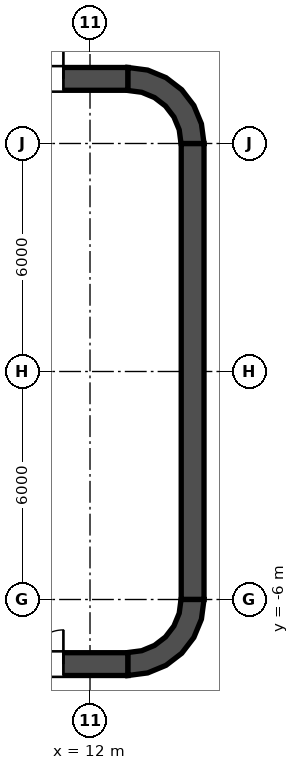
"""IFC4 building model, lengths in metres.
Left out: names, types, materials, properties, quantities, classifications, styles, units other than length and angle.
Written with IfcOpenShell. Run it as: python <this file> out.ifc"""

import sys

from ifc_helpers import new_model, si_unit, direction, frame, frame_2d, origin, place, context, subcontext, project, spatial, polyline, rectangle, outline, extrude, element, fill, save


model = new_model("IFC4")
c1 = context("Model", 3, precision=1e-05, world=origin(), true_north=direction((0.0, 1.0)))
c2 = subcontext(c1, "Body", "Model", "MODEL_VIEW")
j1 = project(units=[si_unit("LENGTHUNIT", "METRE"), si_unit("PLANEANGLEUNIT", "RADIAN")], contexts=[c1])
p1 = place(None, origin())
s1 = spatial("IfcSite", under=j1, at=p1, CompositionType="ELEMENT")
p2 = place(p1, origin())
s2 = spatial("IfcBuilding", under=s1, at=p2, CompositionType="ELEMENT")
p3 = place(p2, frame((0.0, 0.0, 144.0)))
s3 = spatial("IfcBuildingStorey", under=s2, at=p3, CompositionType="ELEMENT", Elevation=144.0)
p4 = place(p3, frame((-13.0, 7.7, 0.0), z_axis=(0.0, 0.0, 1.0), x_axis=(1.0, 0.0, 0.0)))
e1 = element("IfcWall", 1, at=p4, inside=s3, PredefinedType="SHEAR", context=c2, shape_type="SweptSolid", body=[
    extrude(rectangle(XDim=26.0, YDim=0.6, at=frame_2d((13.0, 0.0))), origin(), (0.0, 0.0, 1.0), 4.2),
])
p5 = place(p4, frame((1.7, 0.0, 0.0)))
e2 = element("IfcOpeningElement", 2, at=p5, cuts=e1, PredefinedType="OPENING", context=c2, shape_type="SweptSolid", body=[
    extrude(rectangle(XDim=1.8, YDim=2.1, at=frame_2d((0.9, 1.05))), frame((0.0, 0.3, 0.0), z_axis=(0.0, -1.0, 0.0), x_axis=(1.0, 0.0, 0.0)), (0.0, 0.0, 1.0), 0.6),
])
p6 = place(p4, frame((22.5, 0.0, 0.0)))
e3 = element("IfcOpeningElement", 3, at=p6, cuts=e1, PredefinedType="OPENING", context=c2, shape_type="SweptSolid", body=[
    extrude(rectangle(XDim=1.8, YDim=2.1, at=frame_2d((0.9, 1.05))), frame((0.0, 0.3, 0.0), z_axis=(0.0, -1.0, 0.0), x_axis=(1.0, 0.0, 0.0)), (0.0, 0.0, 1.0), 0.6),
])
p7 = place(p3, frame((-13.0, -7.7, 0.0), z_axis=(0.0, 0.0, 1.0), x_axis=(1.0, 0.0, 0.0)))
e4 = element("IfcWall", 4, at=p7, inside=s3, PredefinedType="SHEAR", context=c2, shape_type="SweptSolid", body=[
    extrude(rectangle(XDim=26.0, YDim=0.6, at=frame_2d((13.0, 0.0))), origin(), (0.0, 0.0, 1.0), 4.2),
])
p8 = place(p7, frame((1.7, 0.0, 0.0)))
e5 = element("IfcOpeningElement", 5, at=p8, cuts=e4, PredefinedType="OPENING", context=c2, shape_type="SweptSolid", body=[
    extrude(rectangle(XDim=1.8, YDim=2.1, at=frame_2d((0.9, 1.05))), frame((0.0, 0.3, 0.0), z_axis=(0.0, -1.0, 0.0), x_axis=(1.0, 0.0, 0.0)), (0.0, 0.0, 1.0), 0.6),
])
p9 = place(p7, frame((22.5, 0.0, 0.0)))
e6 = element("IfcOpeningElement", 6, at=p9, cuts=e4, PredefinedType="OPENING", context=c2, shape_type="SweptSolid", body=[
    extrude(rectangle(XDim=1.8, YDim=2.1, at=frame_2d((0.9, 1.05))), frame((0.0, 0.3, 0.0), z_axis=(0.0, -1.0, 0.0), x_axis=(1.0, 0.0, 0.0)), (0.0, 0.0, 1.0), 0.6),
])
p10 = place(p3, frame((14.7, -6.0, 0.0), z_axis=(0.0, 0.0, 1.0), x_axis=(0.0, 1.0, 0.0)))
e7 = element("IfcWall", 7, at=p10, inside=s3, PredefinedType="SHEAR", context=c2, shape_type="SweptSolid", body=[
    extrude(rectangle(XDim=12.0, YDim=0.6, at=frame_2d((6.0, 0.0))), origin(), (0.0, 0.0, 1.0), 4.2),
])
p11 = place(p3, origin())
e8 = element("IfcWall", 8, at=p11, inside=s3, PredefinedType="SHEAR", context=c2, shape_type="SweptSolid", body=[
    extrude(outline(polyline([(13.0, 8.0), (13.0, 7.395), (13.361, 7.347), (13.698, 7.208), (13.986, 6.986), (14.208, 6.698), (14.347, 6.361), (14.395, 6.0), (15.0, 6.0), (14.932, 6.518), (14.732, 7.0), (14.414, 7.414), (14.0, 7.732), (13.518, 7.932), (13.0, 8.0)])), origin(), (0.0, 0.0, 1.0), 4.2),
])
e9 = element("IfcWall", 9, at=p11, inside=s3, PredefinedType="SHEAR", context=c2, shape_type="SweptSolid", body=[
    extrude(outline(polyline([(15.0, -6.0), (14.395, -6.0), (14.347, -6.361), (14.208, -6.698), (13.986, -6.986), (13.698, -7.208), (13.361, -7.347), (13.0, -7.395), (13.0, -8.0), (13.518, -7.932), (14.0, -7.732), (14.414, -7.414), (14.732, -7.0), (14.932, -6.518), (15.0, -6.0)])), origin(), (0.0, 0.0, 1.0), 4.2),
])
p12 = place(p3, frame((11.8, -7.4, 0.0), z_axis=(0.0, 0.0, 1.0), x_axis=(0.0, 1.0, 0.0)))
e10 = element("IfcWall", 10, at=p12, inside=s3, PredefinedType="SOLIDWALL", context=c2, shape_type="SweptSolid", body=[
    extrude(rectangle(XDim=14.8, YDim=0.4, at=frame_2d((7.4, 0.0))), origin(), (0.0, 0.0, 1.0), 3.9),
])
p13 = place(p12, frame((11.2, 0.0, 0.0)))
e11 = element("IfcOpeningElement", 11, at=p13, cuts=e10, PredefinedType="OPENING", context=c2, shape_type="SweptSolid", body=[
    extrude(rectangle(XDim=1.1, YDim=2.1, at=frame_2d((0.55, 1.05))), frame((0.0, 0.2, 0.0), z_axis=(0.0, -1.0, 0.0), x_axis=(1.0, 0.0, 0.0)), (0.0, 0.0, 1.0), 0.4),
])
p14 = place(p12, frame((8.3, 0.0, 0.0)))
e12 = element("IfcOpeningElement", 12, at=p14, cuts=e10, PredefinedType="OPENING", context=c2, shape_type="SweptSolid", body=[
    extrude(rectangle(XDim=1.1, YDim=2.1, at=frame_2d((0.55, 1.05))), frame((0.0, 0.2, 0.0), z_axis=(0.0, -1.0, 0.0), x_axis=(1.0, 0.0, 0.0)), (0.0, 0.0, 1.0), 0.4),
])
p15 = place(p12, frame((5.4, 0.0, 0.0)))
e13 = element("IfcOpeningElement", 13, at=p15, cuts=e10, PredefinedType="OPENING", context=c2, shape_type="SweptSolid", body=[
    extrude(rectangle(XDim=1.1, YDim=2.1, at=frame_2d((0.55, 1.05))), frame((0.0, 0.2, 0.0), z_axis=(0.0, -1.0, 0.0), x_axis=(1.0, 0.0, 0.0)), (0.0, 0.0, 1.0), 0.4),
])
p16 = place(p12, frame((13.552, 0.0, 0.0)))
e14 = element("IfcOpeningElement", 14, at=p16, cuts=e10, PredefinedType="OPENING", context=c2, shape_type="SweptSolid", body=[
    extrude(rectangle(XDim=0.9, YDim=2.1, at=frame_2d((0.45, 1.05))), frame((0.0, 0.2, 0.0), z_axis=(0.0, -1.0, 0.0), x_axis=(1.0, 0.0, 0.0)), (0.0, 0.0, 1.0), 0.4),
])
p17 = place(p12, frame((0.347, 0.0, 0.0)))
e15 = element("IfcOpeningElement", 15, at=p17, cuts=e10, PredefinedType="OPENING", context=c2, shape_type="SweptSolid", body=[
    extrude(rectangle(XDim=0.9, YDim=2.1, at=frame_2d((0.45, 1.05))), frame((0.0, 0.2, 0.0), z_axis=(0.0, -1.0, 0.0), x_axis=(1.0, 0.0, 0.0)), (0.0, 0.0, 1.0), 0.4),
])
e16 = element("IfcWall", 16, at=p11, inside=s3, PredefinedType="SOLIDWALL", context=c2, shape_type="SweptSolid", body=[
    extrude(outline(polyline([(12.0, -5.675), (12.0, -5.925), (14.15, -5.925), (14.4, -5.925), (14.4, -5.675), (14.4, -3.025), (14.4, -2.775), (14.4, -0.125), (14.4, 0.125), (14.4, 2.775), (14.4, 3.025), (14.4, 5.675), (14.4, 5.925), (14.15, 5.925), (12.0, 5.925), (12.0, 5.675), (14.15, 5.675), (14.15, 3.025), (12.0, 3.025), (12.0, 2.775), (14.15, 2.775), (14.15, 0.125), (12.0, 0.125), (12.0, -0.125), (14.15, -0.125), (14.15, -2.775), (12.0, -2.775), (12.0, -3.025), (14.15, -3.025), (14.15, -5.675), (12.0, -5.675)])), origin(), (0.0, 0.0, 1.0), 3.9),
])
p18 = place(p13, origin())
e17 = element("IfcDoor", 17, at=p18, inside=s3, OperationType="DOUBLE_DOOR_SLIDING", PredefinedType="DOOR", context=c2, shape_type="SweptSolid", body=[
    extrude(rectangle(XDim=1.1, YDim=2.1, at=frame_2d((0.55, 1.05))), frame((0.0, 0.025, 0.0), z_axis=(0.0, -1.0, 0.0), x_axis=(1.0, 0.0, 0.0)), (0.0, 0.0, 1.0), 0.05),
])
fill(e11, e17)
p19 = place(p14, origin())
e18 = element("IfcDoor", 18, at=p19, inside=s3, OperationType="DOUBLE_DOOR_SLIDING", PredefinedType="DOOR", context=c2, shape_type="SweptSolid", body=[
    extrude(rectangle(XDim=1.1, YDim=2.1, at=frame_2d((0.55, 1.05))), frame((0.0, 0.025, 0.0), z_axis=(0.0, -1.0, 0.0), x_axis=(1.0, 0.0, 0.0)), (0.0, 0.0, 1.0), 0.05),
])
fill(e12, e18)
p20 = place(p15, origin())
e19 = element("IfcDoor", 19, at=p20, inside=s3, OperationType="DOUBLE_DOOR_SLIDING", PredefinedType="DOOR", context=c2, shape_type="SweptSolid", body=[
    extrude(rectangle(XDim=1.1, YDim=2.1, at=frame_2d((0.55, 1.05))), frame((0.0, 0.025, 0.0), z_axis=(0.0, -1.0, 0.0), x_axis=(1.0, 0.0, 0.0)), (0.0, 0.0, 1.0), 0.05),
])
fill(e13, e19)
p21 = place(p16, origin())
e20 = element("IfcDoor", 20, at=p21, inside=s3, OperationType="SINGLE_SWING_RIGHT", PredefinedType="DOOR", context=c2, shape_type="SweptSolid", body=[
    extrude(rectangle(XDim=0.9, YDim=2.1, at=frame_2d((0.45, 1.05))), frame((0.0, 0.025, 0.0), z_axis=(0.0, -1.0, 0.0), x_axis=(1.0, 0.0, 0.0)), (0.0, 0.0, 1.0), 0.05),
])
fill(e14, e20)
p22 = place(p17, origin())
e21 = element("IfcDoor", 21, at=p22, inside=s3, OperationType="SINGLE_SWING_RIGHT", PredefinedType="DOOR", context=c2, shape_type="SweptSolid", body=[
    extrude(rectangle(XDim=0.9, YDim=2.1, at=frame_2d((0.45, 1.05))), frame((0.0, 0.025, 0.0), z_axis=(0.0, -1.0, 0.0), x_axis=(1.0, 0.0, 0.0)), (0.0, 0.0, 1.0), 0.05),
])
fill(e15, e21)
p23 = place(p6, origin())
e22 = element("IfcDoor", 22, at=p23, inside=s3, OperationType="DOUBLE_DOOR_SINGLE_SWING", PredefinedType="DOOR", context=c2, shape_type="SweptSolid", body=[
    extrude(rectangle(XDim=1.8, YDim=2.1, at=frame_2d((0.9, 1.05))), frame((0.0, 0.025, 0.0), z_axis=(0.0, -1.0, 0.0), x_axis=(1.0, 0.0, 0.0)), (0.0, 0.0, 1.0), 0.05),
])
fill(e3, e22)
p24 = place(p9, origin())
e23 = element("IfcDoor", 23, at=p24, inside=s3, OperationType="DOUBLE_DOOR_SINGLE_SWING", PredefinedType="DOOR", context=c2, shape_type="SweptSolid", body=[
    extrude(rectangle(XDim=1.8, YDim=2.1, at=frame_2d((0.9, 1.05))), frame((0.0, 0.025, 0.0), z_axis=(0.0, -1.0, 0.0), x_axis=(1.0, 0.0, 0.0)), (0.0, 0.0, 1.0), 0.05),
])
fill(e6, e23)
save(model, sys.argv[1])
